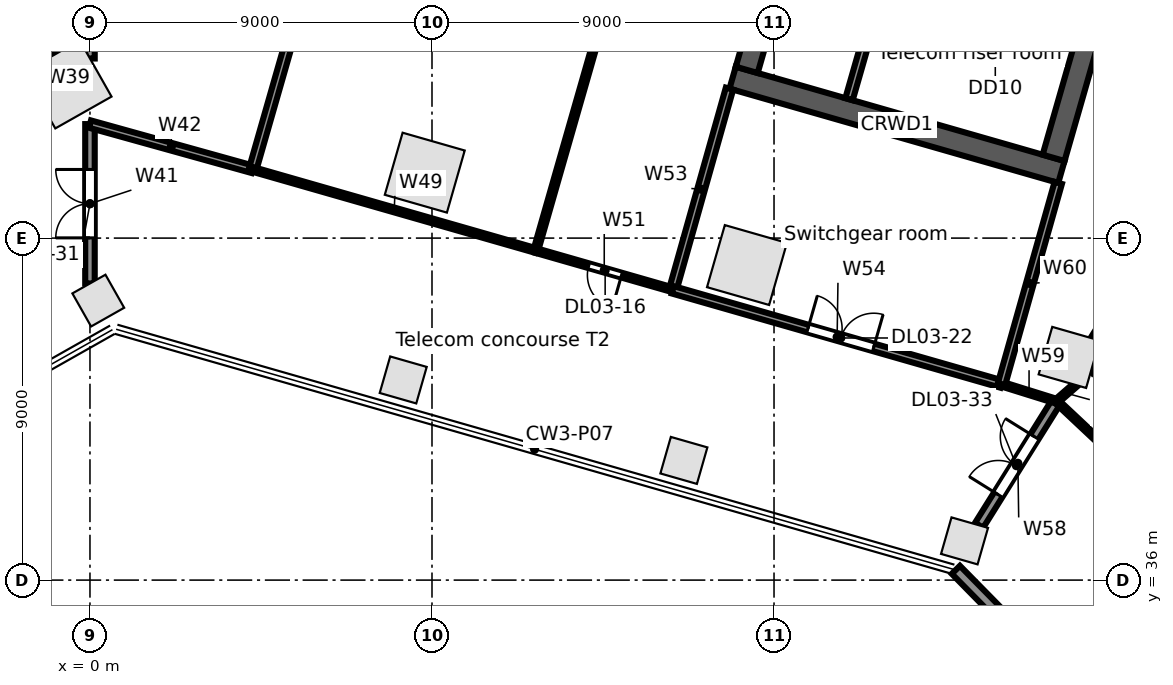
"""IFC4 building model, lengths in metres.
Left out: names, types, materials, properties, quantities, classifications, styles, units other than length and angle.
Written with IfcOpenShell. Run it as: python <this file> out.ifc"""

import sys

from ifc_helpers import new_model, si_unit, direction, frame, frame_2d, origin, origin_2d, place, context, subcontext, project, spatial, rectangle, extrude, element, fill, save


model = new_model("IFC4")
c1 = context("Model", 3, precision=1e-05, world=origin(), true_north=direction((0.0, 1.0)))
c2 = subcontext(c1, "Body", "Model", "MODEL_VIEW")
j1 = project(units=[si_unit("LENGTHUNIT", "METRE"), si_unit("PLANEANGLEUNIT", "RADIAN")], contexts=[c1])
p1 = place(None, origin())
s1 = spatial("IfcSite", under=j1, at=p1, CompositionType="ELEMENT")
p2 = place(p1, origin())
s2 = spatial("IfcBuilding", under=s1, at=p2, CompositionType="ELEMENT")
p3 = place(p2, frame((0.0, 0.0, 21.5)))
s3 = spatial("IfcBuildingStorey", under=s2, at=p3, CompositionType="ELEMENT", Elevation=21.5)
for number, where, z_axis, x_axis in (
    (1, (-0.591, 49.044, 0.0), (0.0, 0.0, 1.0), (0.87, 0.492, 0.0)),
    (2, (8.81, 46.722, 0.0), (0.0, 0.0, 1.0), (0.961, -0.276, 0.0)),
    (3, (17.288, 44.291, 0.0), (0.0, 0.0, 1.0), (0.961, -0.276, 0.0)),
):
    element("IfcColumn", number, at=place(p3, frame(where, z_axis=z_axis, x_axis=x_axis)), inside=s3, PredefinedType="COLUMN", context=c2, shape_type="SweptSolid", body=[
        extrude(rectangle(XDim=1.7, YDim=1.7, at=origin_2d()), origin(), (0.0, 0.0, 1.0), 5.0),
    ])
p4 = place(p3, frame((25.767, 41.86, 0.0), z_axis=(0.0, 0.0, 1.0), x_axis=(0.961261695938, -0.275637355817, 0.0)))
e4 = element("IfcColumn", 4, at=p4, inside=s3, PredefinedType="COLUMN", context=c2, shape_type="SweptSolid", body=[
    extrude(rectangle(XDim=1.3, YDim=1.3, at=origin_2d()), origin(), (0.0, 0.0, 1.0), 5.0),
])
for number, where, z_axis, x_axis in (
    (5, (0.219, 43.355, 0.0), (0.0, 0.0, 1.0), (0.87, 0.492, 0.0)),
    (6, (8.243, 41.267, 0.0), (0.0, 0.0, 1.0), (0.961, -0.276, 0.0)),
    (7, (15.628, 39.149, 0.0), (0.0, 0.0, 1.0), (0.961, -0.276, 0.0)),
    (8, (23.013, 37.032, 0.0), (0.0, 0.0, 1.0), (0.961, -0.276, 0.0)),
):
    element("IfcColumn", number, at=place(p3, frame(where, z_axis=z_axis, x_axis=x_axis)), inside=s3, PredefinedType="COLUMN", context=c2, shape_type="SweptSolid", body=[
        extrude(rectangle(XDim=1.0, YDim=1.0, at=origin_2d()), origin(), (0.0, 0.0, 1.0), 4.68),
    ])
p5 = place(p3, frame((36.376, 22.44, 0.0), z_axis=(0.0, 0.0, 1.0), x_axis=(-0.700917061273, 0.713242787006, 0.0)))
e9 = element("IfcWall", 9, at=p5, inside=s3, PredefinedType="STANDARD", context=c2, shape_type="SweptSolid", body=[
    extrude(rectangle(XDim=19.391, YDim=0.3, at=frame_2d((9.696, 0.0))), origin(), (0.0, 0.0, 1.0), 4.68),
])
p6 = place(p3, frame((16.911, 49.221, 0.0), z_axis=(0.0, 0.0, 1.0), x_axis=(0.96126248289, -0.275634611374, 0.0)))
e10 = element("IfcWall", 10, at=p6, inside=s3, PredefinedType="SOLIDWALL", context=c2, shape_type="SweptSolid", body=[
    extrude(rectangle(XDim=9.0, YDim=0.6, at=frame_2d((4.5, 0.0))), origin(), (0.0, 0.0, 1.0), 4.68),
])
p7 = place(p3, frame((17.282, 49.427, 0.0), z_axis=(0.0, 0.0, 1.0), x_axis=(0.275631631629, 0.961263337304, 0.0)))
e11 = element("IfcWall", 11, at=p7, inside=s3, PredefinedType="SOLIDWALL", context=c2, shape_type="SweptSolid", body=[
    extrude(rectangle(XDim=10.8, YDim=0.6, at=frame_2d((5.4, 0.0))), origin(), (0.0, 0.0, 1.0), 4.68),
])
p8 = place(p7, frame((4.8, 0.0, 0.0)))
e12 = element("IfcOpeningElement", 12, at=p8, cuts=e11, PredefinedType="OPENING", context=c2, shape_type="SweptSolid", body=[
    extrude(rectangle(XDim=1.2, YDim=2.1, at=frame_2d((0.6, 1.05))), frame((0.0, 0.31, 0.0), z_axis=(0.0, -1.0, 0.0), x_axis=(1.0, 0.0, 0.0)), (0.0, 0.0, 1.0), 0.62),
])
p9 = place(p3, frame((19.973, 48.655, 0.0), z_axis=(0.0, 0.0, 1.0), x_axis=(0.275668441653, 0.961252781674, 0.0)))
e13 = element("IfcWall", 13, at=p9, inside=s3, PredefinedType="SOLIDWALL", context=c2, shape_type="SweptSolid", body=[
    extrude(rectangle(XDim=4.05, YDim=0.2, at=frame_2d((2.025, 0.0))), origin(), (0.0, 0.0, 1.0), 4.68),
])
p10 = place(p3, frame((25.356, 47.112, 0.0), z_axis=(0.0, 0.0, 1.0), x_axis=(0.275631631629, 0.961263337304, 0.0)))
e14 = element("IfcWall", 14, at=p10, inside=s3, PredefinedType="SOLIDWALL", context=c2, shape_type="SweptSolid", body=[
    extrude(rectangle(XDim=10.8, YDim=0.6, at=frame_2d((5.4, 0.0))), origin(), (0.0, 0.0, 1.0), 4.68),
])
p11 = place(p10, frame((4.8, 0.0, 0.0)))
e15 = element("IfcOpeningElement", 15, at=p11, cuts=e14, PredefinedType="OPENING", context=c2, shape_type="SweptSolid", body=[
    extrude(rectangle(XDim=1.2, YDim=2.1, at=frame_2d((0.6, 1.05))), frame((0.0, 0.31, 0.0), z_axis=(0.0, -1.0, 0.0), x_axis=(1.0, 0.0, 0.0)), (0.0, 0.0, 1.0), 0.62),
])
p12 = place(p3, frame((-1.883, 51.467, 0.0), z_axis=(0.0, 0.0, 1.0), x_axis=(0.477162952876, -0.878814836244, 0.0)))
e16 = element("IfcWall", 16, at=p12, inside=s3, PredefinedType="PARTITIONING", context=c2, shape_type="SweptSolid", body=[
    extrude(rectangle(XDim=1.895, YDim=0.2, at=frame_2d((0.947, 0.0))), origin(), (0.0, 0.0, 1.0), 4.68),
])
p13 = place(p3, frame((0.0, 43.806, 0.0), z_axis=(0.0, 0.0, 1.0), x_axis=(0.0, 1.0, 0.0)))
e17 = element("IfcWall", 17, at=p13, inside=s3, PredefinedType="PARTITIONING", context=c2, shape_type="SweptSolid", body=[
    extrude(rectangle(XDim=4.194, YDim=0.25, at=frame_2d((2.097, 0.0))), origin(), (0.0, 0.0, 1.0), 3.742),
])
p14 = place(p13, frame((1.2, 0.0, 0.0)))
e18 = element("IfcOpeningElement", 18, at=p14, cuts=e17, PredefinedType="OPENING", context=c2, shape_type="SweptSolid", body=[
    extrude(rectangle(XDim=1.8, YDim=2.1, at=frame_2d((0.9, 1.05))), frame((0.0, 0.135, 0.0), z_axis=(0.0, -1.0, 0.0), x_axis=(1.0, 0.0, 0.0)), (0.0, 0.0, 1.0), 0.27),
])
p15 = place(p3, frame((0.0, 48.0, 0.0), z_axis=(0.0, 0.0, 1.0), x_axis=(0.963400508162, -0.268066150181, 0.0)))
e19 = element("IfcWall", 19, at=p15, inside=s3, PredefinedType="PARTITIONING", context=c2, shape_type="SweptSolid", body=[
    extrude(rectangle(XDim=4.443, YDim=0.2, at=frame_2d((2.221, 0.0))), origin(), (0.0, 0.0, 1.0), 4.68),
])
p16 = place(p3, frame((0.0, 49.726, 0.0), z_axis=(0.0, 0.0, 1.0), x_axis=(0.0, 1.0, 0.0)))
e20 = element("IfcWall", 20, at=p16, inside=s3, PredefinedType="PARTITIONING", context=c2, shape_type="SweptSolid", body=[
    extrude(rectangle(XDim=9.424, YDim=0.25, at=frame_2d((4.712, 0.0))), origin(), (0.0, 0.0, 1.0), 4.68),
])
p17 = place(p3, frame((4.28, 46.809, 0.0), z_axis=(0.0, 0.0, 1.0), x_axis=(0.27566906052, 0.961252604195, 0.0)))
e21 = element("IfcWall", 21, at=p17, inside=s3, PredefinedType="PARTITIONING", context=c2, shape_type="SweptSolid", body=[
    extrude(rectangle(XDim=20.985, YDim=0.2, at=frame_2d((10.493, 0.0))), origin(), (0.0, 0.0, 1.0), 3.742),
])
p18 = place(p3, frame((4.28, 46.809, 0.0), z_axis=(0.0, 0.0, 1.0), x_axis=(0.961270337968, -0.275607215693, 0.0)))
e22 = element("IfcWall", 22, at=p18, inside=s3, PredefinedType="PARTITIONING", context=c2, shape_type="SweptSolid", body=[
    extrude(rectangle(XDim=7.75, YDim=0.125, at=frame_2d((3.875, 0.0))), origin(), (0.0, 0.0, 1.0), 4.048),
])
p19 = place(p3, frame((11.73, 44.673, 0.0), z_axis=(0.0, 0.0, 1.0), x_axis=(0.961228613303, -0.275752702557, 0.0)))
e23 = element("IfcWall", 23, at=p19, inside=s3, PredefinedType="PARTITIONING", context=c2, shape_type="SweptSolid", body=[
    extrude(rectangle(XDim=3.75, YDim=0.125, at=frame_2d((1.875, 0.0))), origin(), (0.0, 0.0, 1.0), 4.68),
])
p20 = place(p19, frame((1.45, 0.0, 0.0)))
e24 = element("IfcOpeningElement", 24, at=p20, cuts=e23, PredefinedType="OPENING", context=c2, shape_type="SweptSolid", body=[
    extrude(rectangle(XDim=0.9, YDim=2.1, at=frame_2d((0.45, 1.05))), frame((0.0, 0.073, 0.0), z_axis=(0.0, -1.0, 0.0), x_axis=(1.0, 0.0, 0.0)), (0.0, 0.0, 1.0), 0.145),
])
p21 = place(p3, frame((11.73, 44.673, 0.0), z_axis=(0.0, 0.0, 1.0), x_axis=(0.275616869382, 0.961267570093, 0.0)))
e25 = element("IfcWall", 25, at=p21, inside=s3, PredefinedType="PARTITIONING", context=c2, shape_type="SweptSolid", body=[
    extrude(rectangle(XDim=23.0, YDim=0.125, at=frame_2d((11.5, 0.0))), origin(), (0.0, 0.0, 1.0), 3.742),
])
p22 = place(p21, frame((10.95, 0.0, 0.0)))
e26 = element("IfcOpeningElement", 26, at=p22, cuts=e25, PredefinedType="OPENING", context=c2, shape_type="SweptSolid", body=[
    extrude(rectangle(XDim=0.9, YDim=2.1, at=frame_2d((0.45, 1.05))), frame((0.0, 0.073, 0.0), z_axis=(0.0, -1.0, 0.0), x_axis=(1.0, 0.0, 0.0)), (0.0, 0.0, 1.0), 0.145),
])
p23 = place(p3, frame((15.335, 43.639, 0.0), z_axis=(0.0, 0.0, 1.0), x_axis=(0.271407455373, 0.962464541252, 0.0)))
e27 = element("IfcWall", 27, at=p23, inside=s3, PredefinedType="PARTITIONING", context=c2, shape_type="SweptSolid", body=[
    extrude(rectangle(XDim=5.501, YDim=0.2, at=frame_2d((2.75, 0.0))), origin(), (0.0, 0.0, 1.0), 3.96),
])
p24 = place(p3, frame((15.335, 43.639, 0.0), z_axis=(0.0, 0.0, 1.0), x_axis=(0.961281982754, -0.275566597455, 0.0)))
e28 = element("IfcWall", 28, at=p24, inside=s3, PredefinedType="PARTITIONING", context=c2, shape_type="SweptSolid", body=[
    extrude(rectangle(XDim=9.0, YDim=0.2, at=frame_2d((4.5, 0.0))), origin(), (0.0, 0.0, 1.0), 3.748),
])
p25 = place(p24, frame((3.7, 0.0, 0.0)))
e29 = element("IfcOpeningElement", 29, at=p25, cuts=e28, PredefinedType="OPENING", context=c2, shape_type="SweptSolid", body=[
    extrude(rectangle(XDim=1.8, YDim=2.1, at=frame_2d((0.9, 1.05))), frame((0.0, 0.11, 0.0), z_axis=(0.0, -1.0, 0.0), x_axis=(1.0, 0.0, 0.0)), (0.0, 0.0, 1.0), 0.22),
])
p26 = place(p3, frame((23.397, 37.442, 0.0), z_axis=(0.0, 0.0, 1.0), x_axis=(0.529805058875, 0.848119448893, 0.0)))
e30 = element("IfcWall", 30, at=p26, inside=s3, PredefinedType="PARTITIONING", context=c2, shape_type="SweptSolid", body=[
    extrude(rectangle(XDim=3.849, YDim=0.25, at=frame_2d((1.924, 0.0))), origin(), (0.0, 0.0, 1.0), 3.742),
])
p27 = place(p26, frame((0.95, 0.0, 0.0)))
e31 = element("IfcOpeningElement", 31, at=p27, cuts=e30, PredefinedType="OPENING", context=c2, shape_type="SweptSolid", body=[
    extrude(rectangle(XDim=1.8, YDim=2.1, at=frame_2d((0.9, 1.05))), frame((0.0, 0.135, 0.0), z_axis=(0.0, -1.0, 0.0), x_axis=(1.0, 0.0, 0.0)), (0.0, 0.0, 1.0), 0.27),
])
p28 = place(p3, frame((23.986, 41.159, 0.0), z_axis=(0.0, 0.0, 1.0), x_axis=(0.954522865266, -0.298137719325, 0.0)))
e32 = element("IfcWall", 32, at=p28, inside=s3, PredefinedType="PARTITIONING", context=c2, shape_type="SweptSolid", body=[
    extrude(rectangle(XDim=1.519, YDim=0.125, at=frame_2d((0.76, 0.0))), origin(), (0.0, 0.0, 1.0), 3.742),
])
p29 = place(p3, frame((23.986, 41.159, 0.0), z_axis=(0.0, 0.0, 1.0), x_axis=(0.271465437068, 0.962448188983, 0.0)))
e33 = element("IfcWall", 33, at=p29, inside=s3, PredefinedType="PARTITIONING", context=c2, shape_type="SweptSolid", body=[
    extrude(rectangle(XDim=5.5, YDim=0.2, at=frame_2d((2.75, 0.0))), origin(), (0.0, 0.0, 1.0), 3.96),
])
p30 = place(p3, frame((25.436, 40.706, 0.0), z_axis=(0.0, 0.0, 1.0), x_axis=(0.753521944961, 0.657422754749, 0.0)))
e34 = element("IfcWall", 34, at=p30, inside=s3, PredefinedType="PARTITIONING", context=c2, shape_type="SweptSolid", body=[
    extrude(rectangle(XDim=0.656, YDim=0.125, at=frame_2d((0.328, 0.0))), origin(), (0.0, 0.0, 1.0), 4.68),
])
p31 = place(p3, frame((25.436, 40.706, 0.0), z_axis=(0.0, 0.0, 1.0), x_axis=(0.729011488135, -0.684501461041, 0.0)))
e35 = element("IfcWall", 35, at=p31, inside=s3, PredefinedType="PARTITIONING", context=c2, shape_type="SweptSolid", body=[
    extrude(rectangle(XDim=4.202, YDim=0.125, at=frame_2d((2.101, 0.0))), origin(), (0.0, 0.0, 1.0), 4.68),
])
p32 = place(p31, frame((1.7, 0.0, 0.0)))
e36 = element("IfcOpeningElement", 36, at=p32, cuts=e35, PredefinedType="OPENING", context=c2, shape_type="SweptSolid", body=[
    extrude(rectangle(XDim=0.9, YDim=2.1, at=frame_2d((0.45, 1.05))), frame((0.0, 0.073, 0.0), z_axis=(0.0, -1.0, 0.0), x_axis=(1.0, 0.0, 0.0)), (0.0, 0.0, 1.0), 0.145),
])
p33 = place(p3, frame((26.338, 41.492, 0.0), z_axis=(0.0, 0.0, 1.0), x_axis=(0.753866696092, 0.657027400131, 0.0)))
e37 = element("IfcWall", 37, at=p33, inside=s3, PredefinedType="PARTITIONING", context=c2, shape_type="SweptSolid", body=[
    extrude(rectangle(XDim=10.493, YDim=0.125, at=frame_2d((5.246, 0.0))), origin(), (0.0, 0.0, 1.0), 3.742),
])
p34 = place(p33, frame((4.7, 0.0, 0.0)))
e38 = element("IfcOpeningElement", 38, at=p34, cuts=e37, PredefinedType="OPENING", context=c2, shape_type="SweptSolid", body=[
    extrude(rectangle(XDim=0.9, YDim=2.1, at=frame_2d((0.45, 1.05))), frame((0.0, 0.073, 0.0), z_axis=(0.0, -1.0, 0.0), x_axis=(1.0, 0.0, 0.0)), (0.0, 0.0, 1.0), 0.145),
])
p35 = place(p3, frame((26.456, 42.338, 0.0), z_axis=(0.0, 0.0, 1.0), x_axis=(0.529866075757, 0.848081329686, 0.0)))
e39 = element("IfcWall", 39, at=p35, inside=s3, PredefinedType="PARTITIONING", context=c2, shape_type="SweptSolid", body=[
    extrude(rectangle(XDim=10.076, YDim=0.25, at=frame_2d((5.038, 0.0))), origin(), (0.0, 0.0, 1.0), 3.742),
])
p36 = place(p20, frame((0.9, 0.0, 0.0), z_axis=(0.0, 0.0, 1.0), x_axis=(-1.0, 0.0, 0.0)))
e40 = element("IfcDoor", 40, at=p36, inside=s3, OperationType="SINGLE_SWING_LEFT", PredefinedType="DOOR", context=c2, shape_type="SweptSolid", body=[
    extrude(rectangle(XDim=0.9, YDim=2.1, at=frame_2d((0.45, 1.05))), frame((0.0, 0.025, 0.0), z_axis=(0.0, -1.0, 0.0), x_axis=(1.0, 0.0, 0.0)), (0.0, 0.0, 1.0), 0.05),
])
fill(e24, e40)
p37 = place(p25, origin())
e41 = element("IfcDoor", 41, at=p37, inside=s3, OperationType="DOUBLE_DOOR_SINGLE_SWING", PredefinedType="DOOR", context=c2, shape_type="SweptSolid", body=[
    extrude(rectangle(XDim=1.8, YDim=2.1, at=frame_2d((0.9, 1.05))), frame((0.0, 0.025, 0.0), z_axis=(0.0, -1.0, 0.0), x_axis=(1.0, 0.0, 0.0)), (0.0, 0.0, 1.0), 0.05),
])
fill(e29, e41)
p38 = place(p14, origin())
e42 = element("IfcDoor", 42, at=p38, inside=s3, OperationType="DOUBLE_DOOR_SINGLE_SWING", PredefinedType="DOOR", context=c2, shape_type="SweptSolid", body=[
    extrude(rectangle(XDim=1.8, YDim=2.1, at=frame_2d((0.9, 1.05))), frame((0.0, 0.025, 0.0), z_axis=(0.0, -1.0, 0.0), x_axis=(1.0, 0.0, 0.0)), (0.0, 0.0, 1.0), 0.05),
])
fill(e18, e42)
p39 = place(p27, origin())
e43 = element("IfcDoor", 43, at=p39, inside=s3, OperationType="DOUBLE_DOOR_SINGLE_SWING", PredefinedType="DOOR", context=c2, shape_type="SweptSolid", body=[
    extrude(rectangle(XDim=1.8, YDim=2.1, at=frame_2d((0.9, 1.05))), frame((0.0, 0.025, 0.0), z_axis=(0.0, -1.0, 0.0), x_axis=(1.0, 0.0, 0.0)), (0.0, 0.0, 1.0), 0.05),
])
fill(e31, e43)
save(model, sys.argv[1])
